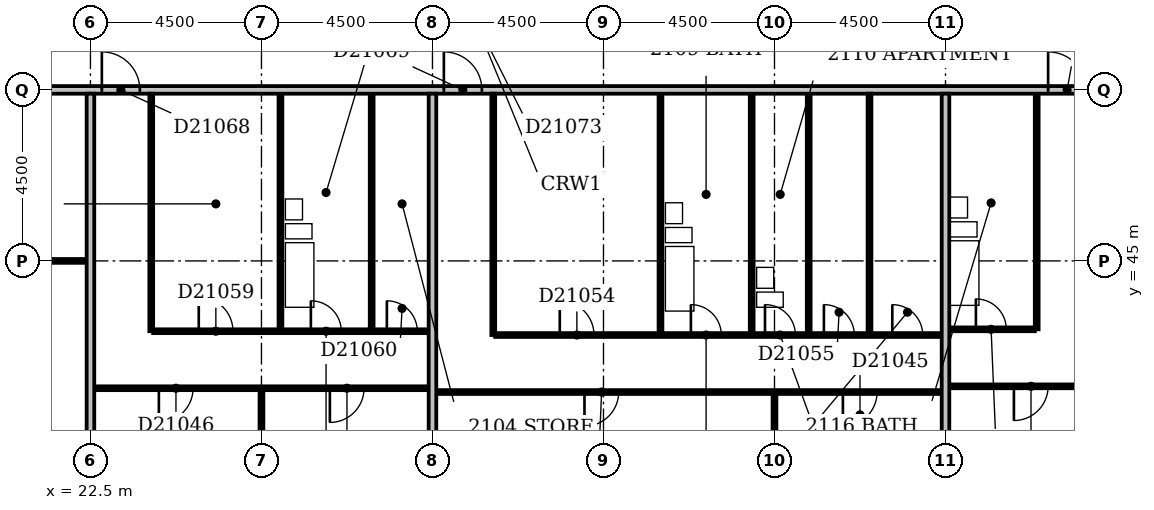
"""IFC4 building model, lengths in metres.
Left out: names, types, materials, properties, quantities, classifications, styles, units other than length and angle.
Written with IfcOpenShell. Run it as: python <this file> out.ifc"""

import sys

from ifc_helpers import new_model, si_unit, direction, frame, frame_2d, origin, place, context, subcontext, project, spatial, rectangle, extrude, element, fill, save


model = new_model("IFC4")
c1 = context("Model", 3, precision=1e-05, world=origin(), true_north=direction((0.0, 1.0)))
c2 = subcontext(c1, "Body", "Model", "MODEL_VIEW")
j1 = project(units=[si_unit("LENGTHUNIT", "METRE"), si_unit("PLANEANGLEUNIT", "RADIAN")], contexts=[c1])
p1 = place(None, origin())
s1 = spatial("IfcSite", under=j1, at=p1, CompositionType="ELEMENT")
p2 = place(p1, origin())
s2 = spatial("IfcBuilding", under=s1, at=p2, CompositionType="ELEMENT")
p3 = place(p2, frame((0.0, 0.0, 86.6)))
s3 = spatial("IfcBuildingStorey", under=s2, at=p3, CompositionType="ELEMENT", Elevation=86.6)
p4 = place(p3, frame((22.5, 36.6, 0.0), z_axis=(0.0, 0.0, 1.0), x_axis=(0.0, 1.0, 0.0)))
e1 = element("IfcWall", 1, at=p4, inside=s3, PredefinedType="PARTITIONING", context=c2, shape_type="SweptSolid", body=[
    extrude(rectangle(XDim=12.8, YDim=0.2, at=frame_2d((6.4, 0.0))), origin(), (0.0, 0.0, 1.0), 3.3),
])
p5 = place(p3, frame((27.0, 36.6, 0.0), z_axis=(0.0, 0.0, 1.0), x_axis=(0.0, 1.0, 0.0)))
e2 = element("IfcWall", 2, at=p5, inside=s3, PredefinedType="PARTITIONING", context=c2, shape_type="SweptSolid", body=[
    extrude(rectangle(XDim=5.0, YDim=0.1, at=frame_2d((2.5, 0.0))), origin(), (0.0, 0.0, 1.0), 2.6),
])
p6 = place(p3, frame((31.5, 36.6, 0.0), z_axis=(0.0, 0.0, 1.0), x_axis=(0.0, 1.0, 0.0)))
e3 = element("IfcWall", 3, at=p6, inside=s3, PredefinedType="PARTITIONING", context=c2, shape_type="SweptSolid", body=[
    extrude(rectangle(XDim=12.8, YDim=0.2, at=frame_2d((6.4, 0.0))), origin(), (0.0, 0.0, 1.0), 3.3),
])
p7 = place(p3, frame((40.5, 36.6, 0.0), z_axis=(0.0, 0.0, 1.0), x_axis=(0.0, 1.0, 0.0)))
e4 = element("IfcWall", 4, at=p7, inside=s3, PredefinedType="PARTITIONING", context=c2, shape_type="SweptSolid", body=[
    extrude(rectangle(XDim=4.9, YDim=0.1, at=frame_2d((2.45, 0.0))), origin(), (0.0, 0.0, 1.0), 3.3),
])
p8 = place(p3, frame((45.0, 36.6, 0.0), z_axis=(0.0, 0.0, 1.0), x_axis=(0.0, 1.0, 0.0)))
e5 = element("IfcWall", 5, at=p8, inside=s3, PredefinedType="PARTITIONING", context=c2, shape_type="SweptSolid", body=[
    extrude(rectangle(XDim=12.8, YDim=0.2, at=frame_2d((6.4, 0.0))), origin(), (0.0, 0.0, 1.0), 2.6),
])
p9 = place(p3, frame((31.6, 41.55, 0.0), z_axis=(0.0, 0.0, 1.0), x_axis=(1.0, 0.0, 0.0)))
e6 = element("IfcWall", 6, at=p9, inside=s3, PredefinedType="PARTITIONING", context=c2, shape_type="SweptSolid", body=[
    extrude(rectangle(XDim=13.3, YDim=0.1, at=frame_2d((6.65, 0.0))), origin(), (0.0, 0.0, 1.0), 3.3),
])
p10 = place(p9, frame((3.9, 0.0, 0.0)))
e7 = element("IfcOpeningElement", 7, at=p10, cuts=e6, PredefinedType="OPENING", context=c2, shape_type="SweptSolid", body=[
    extrude(rectangle(XDim=0.9, YDim=2.1, at=frame_2d((0.45, 1.05))), frame((0.0, 0.062, 0.0), z_axis=(0.0, -1.0, 0.0), x_axis=(1.0, 0.0, 0.0)), (0.0, 0.0, 1.0), 0.124),
])
p11 = place(p9, frame((10.7, 0.0, 0.0)))
e8 = element("IfcOpeningElement", 8, at=p11, cuts=e6, PredefinedType="OPENING", context=c2, shape_type="SweptSolid", body=[
    extrude(rectangle(XDim=0.9, YDim=2.1, at=frame_2d((0.45, 1.05))), frame((0.0, 0.062, 0.0), z_axis=(0.0, -1.0, 0.0), x_axis=(1.0, 0.0, 0.0)), (0.0, 0.0, 1.0), 0.124),
])
p12 = place(p3, frame((22.6, 41.65, 0.0), z_axis=(0.0, 0.0, 1.0), x_axis=(1.0, 0.0, 0.0)))
e9 = element("IfcWall", 9, at=p12, inside=s3, PredefinedType="PARTITIONING", context=c2, shape_type="SweptSolid", body=[
    extrude(rectangle(XDim=8.8, YDim=0.1, at=frame_2d((4.4, 0.0))), origin(), (0.0, 0.0, 1.0), 3.3),
])
p13 = place(p12, frame((1.7, 0.0, 0.0)))
e10 = element("IfcOpeningElement", 10, at=p13, cuts=e9, PredefinedType="OPENING", context=c2, shape_type="SweptSolid", body=[
    extrude(rectangle(XDim=0.9, YDim=2.1, at=frame_2d((0.45, 1.05))), frame((0.0, 0.062, 0.0), z_axis=(0.0, -1.0, 0.0), x_axis=(1.0, 0.0, 0.0)), (0.0, 0.0, 1.0), 0.124),
])
p14 = place(p12, frame((6.2, 0.0, 0.0)))
e11 = element("IfcOpeningElement", 11, at=p14, cuts=e9, PredefinedType="OPENING", context=c2, shape_type="SweptSolid", body=[
    extrude(rectangle(XDim=0.9, YDim=2.1, at=frame_2d((0.45, 1.05))), frame((0.0, 0.062, 0.0), z_axis=(0.0, -1.0, 0.0), x_axis=(1.0, 0.0, 0.0)), (0.0, 0.0, 1.0), 0.124),
])
p15 = place(p3, frame((45.1, 41.7, 0.0), z_axis=(0.0, 0.0, 1.0), x_axis=(1.0, 0.0, 0.0)))
e12 = element("IfcWall", 12, at=p15, inside=s3, PredefinedType="PARTITIONING", context=c2, shape_type="SweptSolid", body=[
    extrude(rectangle(XDim=17.8, YDim=0.1, at=frame_2d((8.9, 0.0))), origin(), (0.0, 0.0, 1.0), 3.3),
])
p16 = place(p15, frame((1.7, 0.0, 0.0)))
e13 = element("IfcOpeningElement", 13, at=p16, cuts=e12, PredefinedType="OPENING", context=c2, shape_type="SweptSolid", body=[
    extrude(rectangle(XDim=0.9, YDim=2.1, at=frame_2d((0.45, 1.05))), frame((0.0, 0.062, 0.0), z_axis=(0.0, -1.0, 0.0), x_axis=(1.0, 0.0, 0.0)), (0.0, 0.0, 1.0), 0.124),
])
p17 = place(p15, frame((6.2, 0.0, 0.0)))
e14 = element("IfcOpeningElement", 14, at=p17, cuts=e12, PredefinedType="OPENING", context=c2, shape_type="SweptSolid", body=[
    extrude(rectangle(XDim=0.9, YDim=2.1, at=frame_2d((0.45, 1.05))), frame((0.0, 0.062, 0.0), z_axis=(0.0, -1.0, 0.0), x_axis=(1.0, 0.0, 0.0)), (0.0, 0.0, 1.0), 0.124),
])
p18 = place(p15, frame((11.85, 0.0, 0.0)))
e15 = element("IfcOpeningElement", 15, at=p18, cuts=e12, PredefinedType="OPENING", context=c2, shape_type="SweptSolid", body=[
    extrude(rectangle(XDim=0.9, YDim=2.1, at=frame_2d((0.45, 1.05))), frame((0.0, 0.062, 0.0), z_axis=(0.0, -1.0, 0.0), x_axis=(1.0, 0.0, 0.0)), (0.0, 0.0, 1.0), 0.124),
])
p19 = place(p15, frame((15.2, 0.0, 0.0)))
e16 = element("IfcOpeningElement", 16, at=p19, cuts=e12, PredefinedType="OPENING", context=c2, shape_type="SweptSolid", body=[
    extrude(rectangle(XDim=0.9, YDim=2.1, at=frame_2d((0.45, 1.05))), frame((0.0, 0.062, 0.0), z_axis=(0.0, -1.0, 0.0), x_axis=(1.0, 0.0, 0.0)), (0.0, 0.0, 1.0), 0.124),
])
p20 = place(p3, frame((33.1, 43.05, 0.0), z_axis=(0.0, 0.0, 1.0), x_axis=(0.0, 1.0, 0.0)))
e17 = element("IfcWall", 17, at=p20, inside=s3, PredefinedType="PARTITIONING", context=c2, shape_type="SweptSolid", body=[
    extrude(rectangle(XDim=6.35, YDim=0.1, at=frame_2d((3.175, 0.0))), origin(), (0.0, 0.0, 1.0), 3.3),
])
p21 = place(p3, frame((33.15, 43.05, 0.0), z_axis=(0.0, 0.0, 1.0), x_axis=(1.0, 0.0, 0.0)))
e18 = element("IfcWall", 18, at=p21, inside=s3, PredefinedType="PARTITIONING", context=c2, shape_type="SweptSolid", body=[
    extrude(rectangle(XDim=11.75, YDim=0.1, at=frame_2d((5.875, 0.0))), origin(), (0.0, 0.0, 1.0), 3.3),
])
p22 = place(p21, frame((5.15, 0.0, 0.0)))
e19 = element("IfcOpeningElement", 19, at=p22, cuts=e18, PredefinedType="OPENING", context=c2, shape_type="SweptSolid", body=[
    extrude(rectangle(XDim=0.8, YDim=2.1, at=frame_2d((0.4, 1.05))), frame((0.0, 0.062, 0.0), z_axis=(0.0, -1.0, 0.0), x_axis=(1.0, 0.0, 0.0)), (0.0, 0.0, 1.0), 0.124),
])
p23 = place(p21, frame((1.7, 0.0, 0.0)))
e20 = element("IfcOpeningElement", 20, at=p23, cuts=e18, PredefinedType="OPENING", context=c2, shape_type="SweptSolid", body=[
    extrude(rectangle(XDim=0.9, YDim=2.1, at=frame_2d((0.45, 1.05))), frame((0.0, 0.062, 0.0), z_axis=(0.0, -1.0, 0.0), x_axis=(1.0, 0.0, 0.0)), (0.0, 0.0, 1.0), 0.124),
])
p24 = place(p21, frame((8.65, 0.0, 0.0)))
e21 = element("IfcOpeningElement", 21, at=p24, cuts=e18, PredefinedType="OPENING", context=c2, shape_type="SweptSolid", body=[
    extrude(rectangle(XDim=0.8, YDim=2.1, at=frame_2d((0.4, 1.05))), frame((0.0, 0.062, 0.0), z_axis=(0.0, -1.0, 0.0), x_axis=(1.0, 0.0, 0.0)), (0.0, 0.0, 1.0), 0.124),
])
p25 = place(p21, frame((10.45, 0.0, 0.0)))
e22 = element("IfcOpeningElement", 22, at=p25, cuts=e18, PredefinedType="OPENING", context=c2, shape_type="SweptSolid", body=[
    extrude(rectangle(XDim=0.8, YDim=2.1, at=frame_2d((0.4, 1.05))), frame((0.0, 0.062, 0.0), z_axis=(0.0, -1.0, 0.0), x_axis=(1.0, 0.0, 0.0)), (0.0, 0.0, 1.0), 0.124),
])
p26 = place(p21, frame((7.1, 0.0, 0.0)))
e23 = element("IfcOpeningElement", 23, at=p26, cuts=e18, PredefinedType="OPENING", context=c2, shape_type="SweptSolid", body=[
    extrude(rectangle(XDim=0.8, YDim=2.1, at=frame_2d((0.4, 1.05))), frame((0.0, 0.062, 0.0), z_axis=(0.0, -1.0, 0.0), x_axis=(1.0, 0.0, 0.0)), (0.0, 0.0, 1.0), 0.124),
])
for number, where, z_axis, x_axis in (
    (24, (37.5, 43.1, 0.0), (0.0, 0.0, 1.0), (0.0, 1.0, 0.0)),
    (25, (39.9, 43.1, 0.0), (0.0, 0.0, 1.0), (0.0, 1.0, 0.0)),
    (26, (41.4, 43.1, 0.0), (0.0, 0.0, 1.0), (0.0, 1.0, 0.0)),
):
    element("IfcWall", number, at=place(p3, frame(where, z_axis=z_axis, x_axis=x_axis)), inside=s3, PredefinedType="PLUMBINGWALL", context=c2, shape_type="SweptSolid", body=[
        extrude(rectangle(XDim=6.3, YDim=0.1, at=frame_2d((3.15, 0.0))), origin(), (0.0, 0.0, 1.0), 3.3),
    ])
p27 = place(p3, frame((43.0, 43.1, 0.0), z_axis=(0.0, 0.0, 1.0), x_axis=(0.0, 1.0, 0.0)))
e27 = element("IfcWall", 27, at=p27, inside=s3, PredefinedType="PARTITIONING", context=c2, shape_type="SweptSolid", body=[
    extrude(rectangle(XDim=6.3, YDim=0.1, at=frame_2d((3.15, 0.0))), origin(), (0.0, 0.0, 1.0), 3.3),
])
p28 = place(p3, frame((24.1, 43.15, 0.0), z_axis=(0.0, 0.0, 1.0), x_axis=(0.0, 1.0, 0.0)))
e28 = element("IfcWall", 28, at=p28, inside=s3, PredefinedType="PARTITIONING", context=c2, shape_type="SweptSolid", body=[
    extrude(rectangle(XDim=6.25, YDim=0.1, at=frame_2d((3.125, 0.0))), origin(), (0.0, 0.0, 1.0), 3.3),
])
p29 = place(p3, frame((24.15, 43.15, 0.0), z_axis=(0.0, 0.0, 1.0), x_axis=(1.0, 0.0, 0.0)))
e29 = element("IfcWall", 29, at=p29, inside=s3, PredefinedType="PARTITIONING", context=c2, shape_type="SweptSolid", body=[
    extrude(rectangle(XDim=7.25, YDim=0.1, at=frame_2d((3.625, 0.0))), origin(), (0.0, 0.0, 1.0), 3.3),
])
p30 = place(p29, frame((4.15, 0.0, 0.0)))
e30 = element("IfcOpeningElement", 30, at=p30, cuts=e29, PredefinedType="OPENING", context=c2, shape_type="SweptSolid", body=[
    extrude(rectangle(XDim=0.8, YDim=2.1, at=frame_2d((0.4, 1.05))), frame((0.0, 0.062, 0.0), z_axis=(0.0, -1.0, 0.0), x_axis=(1.0, 0.0, 0.0)), (0.0, 0.0, 1.0), 0.124),
])
p31 = place(p29, frame((1.2, 0.0, 0.0)))
e31 = element("IfcOpeningElement", 31, at=p31, cuts=e29, PredefinedType="OPENING", context=c2, shape_type="SweptSolid", body=[
    extrude(rectangle(XDim=0.9, YDim=2.1, at=frame_2d((0.45, 1.05))), frame((0.0, 0.062, 0.0), z_axis=(0.0, -1.0, 0.0), x_axis=(1.0, 0.0, 0.0)), (0.0, 0.0, 1.0), 0.124),
])
p32 = place(p29, frame((6.15, 0.0, 0.0)))
e32 = element("IfcOpeningElement", 32, at=p32, cuts=e29, PredefinedType="OPENING", context=c2, shape_type="SweptSolid", body=[
    extrude(rectangle(XDim=0.8, YDim=2.1, at=frame_2d((0.4, 1.05))), frame((0.0, 0.062, 0.0), z_axis=(0.0, -1.0, 0.0), x_axis=(1.0, 0.0, 0.0)), (0.0, 0.0, 1.0), 0.124),
])
p33 = place(p3, frame((27.5, 43.2, 0.0), z_axis=(0.0, 0.0, 1.0), x_axis=(0.0, 1.0, 0.0)))
e33 = element("IfcWall", 33, at=p33, inside=s3, PredefinedType="PLUMBINGWALL", context=c2, shape_type="SweptSolid", body=[
    extrude(rectangle(XDim=6.2, YDim=0.1, at=frame_2d((3.1, 0.0))), origin(), (0.0, 0.0, 1.0), 2.6),
])
p34 = place(p3, frame((29.9, 43.2, 0.0), z_axis=(0.0, 0.0, 1.0), x_axis=(0.0, 1.0, 0.0)))
e34 = element("IfcWall", 34, at=p34, inside=s3, PredefinedType="PLUMBINGWALL", context=c2, shape_type="SweptSolid", body=[
    extrude(rectangle(XDim=6.2, YDim=0.1, at=frame_2d((3.1, 0.0))), origin(), (0.0, 0.0, 1.0), 3.3),
])
p35 = place(p3, frame((45.1, 43.2, 0.0), z_axis=(0.0, 0.0, 1.0), x_axis=(1.0, 0.0, 0.0)))
e35 = element("IfcWall", 35, at=p35, inside=s3, PredefinedType="PARTITIONING", context=c2, shape_type="SweptSolid", body=[
    extrude(rectangle(XDim=2.25, YDim=0.1, at=frame_2d((1.125, 0.0))), origin(), (0.0, 0.0, 1.0), 3.3),
])
p36 = place(p35, frame((0.7, 0.0, 0.0)))
e36 = element("IfcOpeningElement", 36, at=p36, cuts=e35, PredefinedType="OPENING", context=c2, shape_type="SweptSolid", body=[
    extrude(rectangle(XDim=0.8, YDim=2.1, at=frame_2d((0.4, 1.05))), frame((0.0, 0.062, 0.0), z_axis=(0.0, -1.0, 0.0), x_axis=(1.0, 0.0, 0.0)), (0.0, 0.0, 1.0), 0.124),
])
p37 = place(p3, frame((47.4, 43.2, 0.0), z_axis=(0.0, 0.0, 1.0), x_axis=(0.0, 1.0, 0.0)))
e37 = element("IfcWall", 37, at=p37, inside=s3, PredefinedType="PLUMBINGWALL", context=c2, shape_type="SweptSolid", body=[
    extrude(rectangle(XDim=6.2, YDim=0.1, at=frame_2d((3.1, 0.0))), origin(), (0.0, 0.0, 1.0), 3.3),
])
p38 = place(p3, frame((9.1, 45.0, 0.0), z_axis=(0.0, 0.0, 1.0), x_axis=(1.0, 0.0, 0.0)))
e38 = element("IfcWall", 38, at=p38, inside=s3, PredefinedType="PARTITIONING", context=c2, shape_type="SweptSolid", body=[
    extrude(rectangle(XDim=13.3, YDim=0.1, at=frame_2d((6.65, 0.0))), origin(), (0.0, 0.0, 1.0), 3.3),
])
p39 = place(p3, frame((9.1, 49.5, 0.0), z_axis=(0.0, 0.0, 1.0), x_axis=(1.0, 0.0, 0.0)))
e39 = element("IfcWall", 39, at=p39, inside=s3, PredefinedType="PARTITIONING", context=c2, shape_type="SweptSolid", body=[
    extrude(rectangle(XDim=57.8, YDim=0.2, at=frame_2d((28.9, 0.0))), origin(), (0.0, 0.0, 1.0), 3.3),
])
p40 = place(p39, frame((13.7, 0.0, 0.0)))
e40 = element("IfcOpeningElement", 40, at=p40, cuts=e39, PredefinedType="OPENING", context=c2, shape_type="SweptSolid", body=[
    extrude(rectangle(XDim=1.0, YDim=2.1, at=frame_2d((0.5, 1.05))), frame((0.0, 0.112, 0.0), z_axis=(0.0, -1.0, 0.0), x_axis=(1.0, 0.0, 0.0)), (0.0, 0.0, 1.0), 0.224),
])
p41 = place(p39, frame((22.7, 0.0, 0.0)))
e41 = element("IfcOpeningElement", 41, at=p41, cuts=e39, PredefinedType="OPENING", context=c2, shape_type="SweptSolid", body=[
    extrude(rectangle(XDim=1.0, YDim=2.1, at=frame_2d((0.5, 1.05))), frame((0.0, 0.112, 0.0), z_axis=(0.0, -1.0, 0.0), x_axis=(1.0, 0.0, 0.0)), (0.0, 0.0, 1.0), 0.224),
])
p42 = place(p39, frame((38.6, 0.0, 0.0)))
e42 = element("IfcOpeningElement", 42, at=p42, cuts=e39, PredefinedType="OPENING", context=c2, shape_type="SweptSolid", body=[
    extrude(rectangle(XDim=1.0, YDim=2.1, at=frame_2d((0.5, 1.05))), frame((0.0, 0.112, 0.0), z_axis=(0.0, -1.0, 0.0), x_axis=(1.0, 0.0, 0.0)), (0.0, 0.0, 1.0), 0.224),
])
p43 = place(p39, frame((55.45, 0.0, 0.0)))
e43 = element("IfcOpeningElement", 43, at=p43, cuts=e39, PredefinedType="OPENING", context=c2, shape_type="SweptSolid", body=[
    extrude(rectangle(XDim=1.0, YDim=2.1, at=frame_2d((0.5, 1.05))), frame((0.0, 0.112, 0.0), z_axis=(0.0, -1.0, 0.0), x_axis=(1.0, 0.0, 0.0)), (0.0, 0.0, 1.0), 0.224),
])
p44 = place(p39, frame((6.15, 0.0, 0.0)))
e44 = element("IfcOpeningElement", 44, at=p44, cuts=e39, PredefinedType="OPENING", context=c2, shape_type="SweptSolid", body=[
    extrude(rectangle(XDim=0.9, YDim=2.1, at=frame_2d((0.45, 1.05))), frame((0.0, 0.112, 0.0), z_axis=(0.0, -1.0, 0.0), x_axis=(1.0, 0.0, 0.0)), (0.0, 0.0, 1.0), 0.224),
])
p45 = place(p10, frame((0.9, 0.0, 0.0), z_axis=(0.0, 0.0, 1.0), x_axis=(-1.0, 0.0, 0.0)))
e45 = element("IfcDoor", 45, at=p45, inside=s3, OperationType="SINGLE_SWING_RIGHT", PredefinedType="DOOR", context=c2, shape_type="SweptSolid", body=[
    extrude(rectangle(XDim=0.9, YDim=2.1, at=frame_2d((0.45, 1.05))), frame((0.0, 0.025, 0.0), z_axis=(0.0, -1.0, 0.0), x_axis=(1.0, 0.0, 0.0)), (0.0, 0.0, 1.0), 0.05),
])
fill(e7, e45)
p46 = place(p11, frame((0.9, 0.0, 0.0), z_axis=(0.0, 0.0, 1.0), x_axis=(-1.0, 0.0, 0.0)))
e46 = element("IfcDoor", 46, at=p46, inside=s3, OperationType="SINGLE_SWING_RIGHT", PredefinedType="DOOR", context=c2, shape_type="SweptSolid", body=[
    extrude(rectangle(XDim=0.9, YDim=2.1, at=frame_2d((0.45, 1.05))), frame((0.0, 0.025, 0.0), z_axis=(0.0, -1.0, 0.0), x_axis=(1.0, 0.0, 0.0)), (0.0, 0.0, 1.0), 0.05),
])
fill(e8, e46)
p47 = place(p13, frame((0.9, 0.0, 0.0), z_axis=(0.0, 0.0, 1.0), x_axis=(-1.0, 0.0, 0.0)))
e47 = element("IfcDoor", 47, at=p47, inside=s3, OperationType="SINGLE_SWING_RIGHT", PredefinedType="DOOR", context=c2, shape_type="SweptSolid", body=[
    extrude(rectangle(XDim=0.9, YDim=2.1, at=frame_2d((0.45, 1.05))), frame((0.0, 0.025, 0.0), z_axis=(0.0, -1.0, 0.0), x_axis=(1.0, 0.0, 0.0)), (0.0, 0.0, 1.0), 0.05),
])
fill(e10, e47)
p48 = place(p14, frame((0.9, 0.0, 0.0), z_axis=(0.0, 0.0, 1.0), x_axis=(-1.0, 0.0, 0.0)))
e48 = element("IfcDoor", 48, at=p48, inside=s3, OperationType="SINGLE_SWING_RIGHT", PredefinedType="DOOR", context=c2, shape_type="SweptSolid", body=[
    extrude(rectangle(XDim=0.9, YDim=2.1, at=frame_2d((0.45, 1.05))), frame((0.0, 0.025, 0.0), z_axis=(0.0, -1.0, 0.0), x_axis=(1.0, 0.0, 0.0)), (0.0, 0.0, 1.0), 0.05),
])
fill(e11, e48)
p49 = place(p16, frame((0.9, 0.0, 0.0), z_axis=(0.0, 0.0, 1.0), x_axis=(-1.0, 0.0, 0.0)))
e49 = element("IfcDoor", 49, at=p49, inside=s3, OperationType="SINGLE_SWING_RIGHT", PredefinedType="DOOR", context=c2, shape_type="SweptSolid", body=[
    extrude(rectangle(XDim=0.9, YDim=2.1, at=frame_2d((0.45, 1.05))), frame((0.0, 0.025, 0.0), z_axis=(0.0, -1.0, 0.0), x_axis=(1.0, 0.0, 0.0)), (0.0, 0.0, 1.0), 0.05),
])
fill(e13, e49)
p50 = place(p22, origin())
e50 = element("IfcDoor", 50, at=p50, inside=s3, OperationType="SINGLE_SWING_LEFT", PredefinedType="DOOR", context=c2, shape_type="SweptSolid", body=[
    extrude(rectangle(XDim=0.8, YDim=2.1, at=frame_2d((0.4, 1.05))), frame((0.0, 0.025, 0.0), z_axis=(0.0, -1.0, 0.0), x_axis=(1.0, 0.0, 0.0)), (0.0, 0.0, 1.0), 0.05),
])
fill(e19, e50)
p51 = place(p23, origin())
e51 = element("IfcDoor", 51, at=p51, inside=s3, OperationType="SINGLE_SWING_LEFT", PredefinedType="DOOR", context=c2, shape_type="SweptSolid", body=[
    extrude(rectangle(XDim=0.9, YDim=2.1, at=frame_2d((0.45, 1.05))), frame((0.0, 0.025, 0.0), z_axis=(0.0, -1.0, 0.0), x_axis=(1.0, 0.0, 0.0)), (0.0, 0.0, 1.0), 0.05),
])
fill(e20, e51)
p52 = place(p24, origin())
e52 = element("IfcDoor", 52, at=p52, inside=s3, OperationType="SINGLE_SWING_LEFT", PredefinedType="DOOR", context=c2, shape_type="SweptSolid", body=[
    extrude(rectangle(XDim=0.8, YDim=2.1, at=frame_2d((0.4, 1.05))), frame((0.0, 0.025, 0.0), z_axis=(0.0, -1.0, 0.0), x_axis=(1.0, 0.0, 0.0)), (0.0, 0.0, 1.0), 0.05),
])
fill(e21, e52)
p53 = place(p25, origin())
e53 = element("IfcDoor", 53, at=p53, inside=s3, OperationType="SINGLE_SWING_LEFT", PredefinedType="DOOR", context=c2, shape_type="SweptSolid", body=[
    extrude(rectangle(XDim=0.8, YDim=2.1, at=frame_2d((0.4, 1.05))), frame((0.0, 0.025, 0.0), z_axis=(0.0, -1.0, 0.0), x_axis=(1.0, 0.0, 0.0)), (0.0, 0.0, 1.0), 0.05),
])
fill(e22, e53)
p54 = place(p26, origin())
e54 = element("IfcDoor", 54, at=p54, inside=s3, OperationType="SINGLE_SWING_LEFT", PredefinedType="DOOR", context=c2, shape_type="SweptSolid", body=[
    extrude(rectangle(XDim=0.8, YDim=2.1, at=frame_2d((0.4, 1.05))), frame((0.0, 0.025, 0.0), z_axis=(0.0, -1.0, 0.0), x_axis=(1.0, 0.0, 0.0)), (0.0, 0.0, 1.0), 0.05),
])
fill(e23, e54)
p55 = place(p30, origin())
e55 = element("IfcDoor", 55, at=p55, inside=s3, OperationType="SINGLE_SWING_LEFT", PredefinedType="DOOR", context=c2, shape_type="SweptSolid", body=[
    extrude(rectangle(XDim=0.8, YDim=2.1, at=frame_2d((0.4, 1.05))), frame((0.0, 0.025, 0.0), z_axis=(0.0, -1.0, 0.0), x_axis=(1.0, 0.0, 0.0)), (0.0, 0.0, 1.0), 0.05),
])
fill(e30, e55)
p56 = place(p31, origin())
e56 = element("IfcDoor", 56, at=p56, inside=s3, OperationType="SINGLE_SWING_LEFT", PredefinedType="DOOR", context=c2, shape_type="SweptSolid", body=[
    extrude(rectangle(XDim=0.9, YDim=2.1, at=frame_2d((0.45, 1.05))), frame((0.0, 0.025, 0.0), z_axis=(0.0, -1.0, 0.0), x_axis=(1.0, 0.0, 0.0)), (0.0, 0.0, 1.0), 0.05),
])
fill(e31, e56)
p57 = place(p32, origin())
e57 = element("IfcDoor", 57, at=p57, inside=s3, OperationType="SINGLE_SWING_LEFT", PredefinedType="DOOR", context=c2, shape_type="SweptSolid", body=[
    extrude(rectangle(XDim=0.8, YDim=2.1, at=frame_2d((0.4, 1.05))), frame((0.0, 0.025, 0.0), z_axis=(0.0, -1.0, 0.0), x_axis=(1.0, 0.0, 0.0)), (0.0, 0.0, 1.0), 0.05),
])
fill(e32, e57)
p58 = place(p36, origin())
e58 = element("IfcDoor", 58, at=p58, inside=s3, OperationType="SINGLE_SWING_LEFT", PredefinedType="DOOR", context=c2, shape_type="SweptSolid", body=[
    extrude(rectangle(XDim=0.8, YDim=2.1, at=frame_2d((0.4, 1.05))), frame((0.0, 0.025, 0.0), z_axis=(0.0, -1.0, 0.0), x_axis=(1.0, 0.0, 0.0)), (0.0, 0.0, 1.0), 0.05),
])
fill(e36, e58)
p59 = place(p40, origin())
e59 = element("IfcDoor", 59, at=p59, inside=s3, OperationType="SINGLE_SWING_LEFT", PredefinedType="DOOR", context=c2, shape_type="SweptSolid", body=[
    extrude(rectangle(XDim=1.0, YDim=2.1, at=frame_2d((0.5, 1.05))), frame((0.0, 0.025, 0.0), z_axis=(0.0, -1.0, 0.0), x_axis=(1.0, 0.0, 0.0)), (0.0, 0.0, 1.0), 0.05),
])
fill(e40, e59)
p60 = place(p41, origin())
e60 = element("IfcDoor", 60, at=p60, inside=s3, OperationType="SINGLE_SWING_LEFT", PredefinedType="DOOR", context=c2, shape_type="SweptSolid", body=[
    extrude(rectangle(XDim=1.0, YDim=2.1, at=frame_2d((0.5, 1.05))), frame((0.0, 0.025, 0.0), z_axis=(0.0, -1.0, 0.0), x_axis=(1.0, 0.0, 0.0)), (0.0, 0.0, 1.0), 0.05),
])
fill(e41, e60)
p61 = place(p42, origin())
e61 = element("IfcDoor", 61, at=p61, inside=s3, OperationType="SINGLE_SWING_LEFT", PredefinedType="DOOR", context=c2, shape_type="SweptSolid", body=[
    extrude(rectangle(XDim=1.0, YDim=2.1, at=frame_2d((0.5, 1.05))), frame((0.0, 0.025, 0.0), z_axis=(0.0, -1.0, 0.0), x_axis=(1.0, 0.0, 0.0)), (0.0, 0.0, 1.0), 0.05),
])
fill(e42, e61)
save(model, sys.argv[1])
